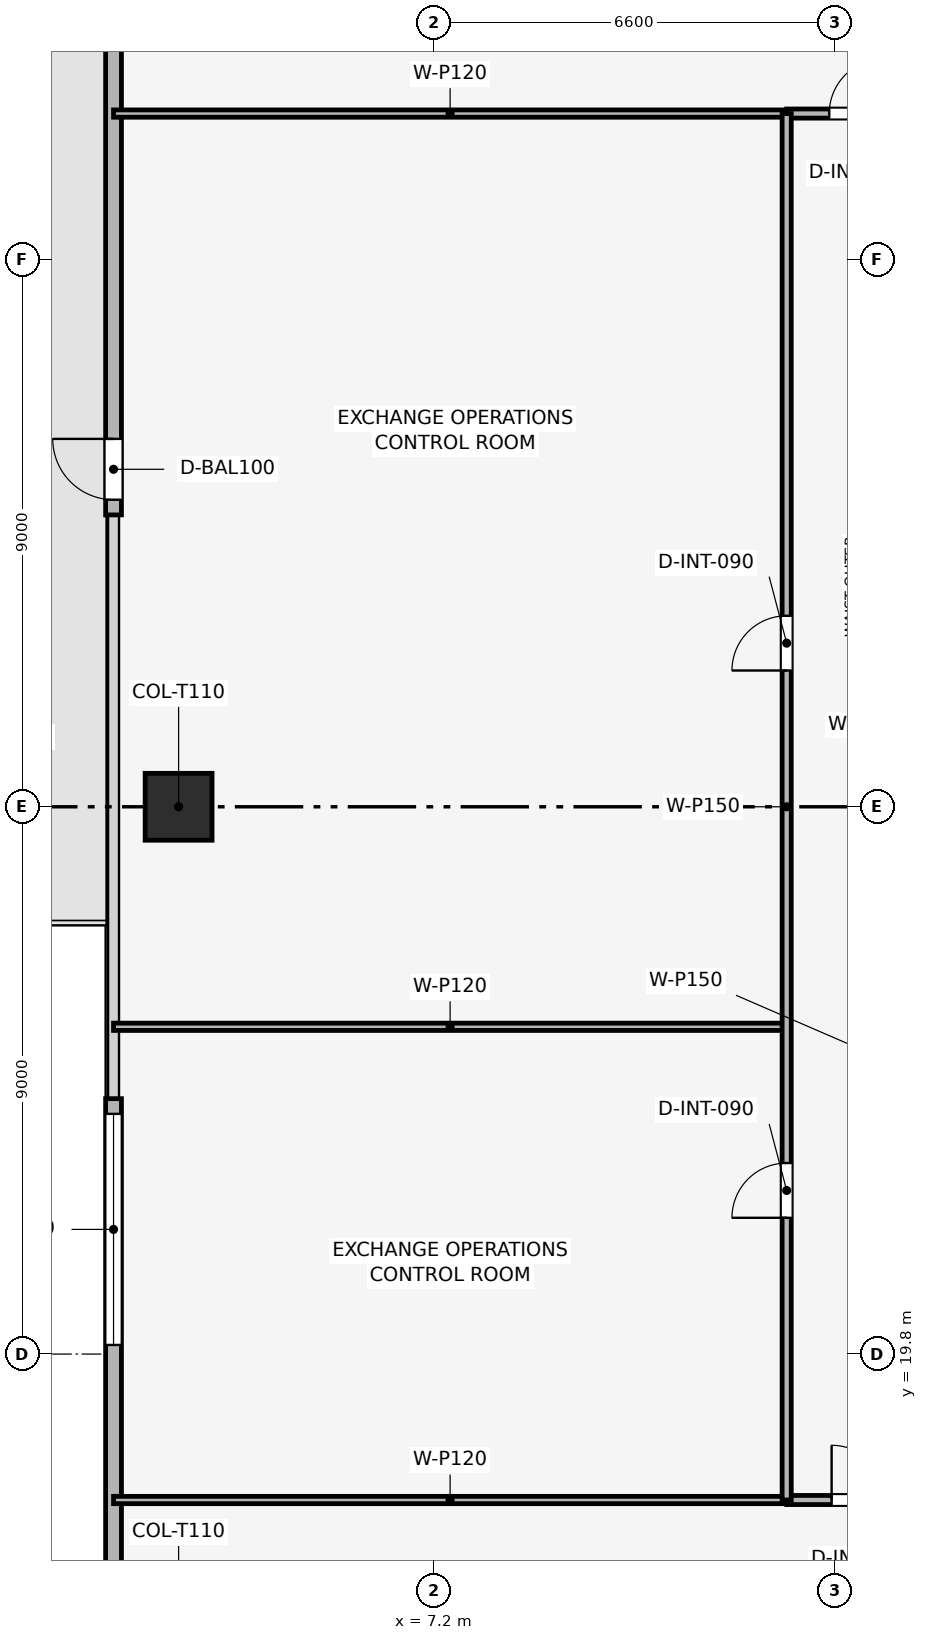
"""IFC4 building model, lengths in metres.
Left out: names, types, materials, properties, quantities, classifications, styles, units other than length and angle.
Written with IfcOpenShell. Run it as: python <this file> out.ifc"""

import sys

from ifc_helpers import new_model, si_unit, direction, frame, frame_2d, origin, origin_2d, place, context, subcontext, project, spatial, rectangle, extrude, element, fill, save


model = new_model("IFC4")
c1 = context("Model", 3, precision=1e-05, world=origin(), true_north=direction((0.0, 1.0)))
c2 = subcontext(c1, "Body", "Model", "MODEL_VIEW")
j1 = project(units=[si_unit("LENGTHUNIT", "METRE"), si_unit("PLANEANGLEUNIT", "RADIAN")], contexts=[c1])
p1 = place(None, origin())
s1 = spatial("IfcSite", under=j1, at=p1, CompositionType="ELEMENT")
p2 = place(p1, origin())
s2 = spatial("IfcBuilding", under=s1, at=p2, CompositionType="ELEMENT")
p3 = place(p2, frame((0.0, 0.0, 218.7)))
s3 = spatial("IfcBuildingStorey", under=s2, at=p3, CompositionType="ELEMENT", Elevation=218.7)
p4 = place(p3, frame((3.0, 28.8, 0.003), z_axis=(0.0, 0.0, 1.0), x_axis=(1.0, 0.0, 0.0)))
e1 = element("IfcColumn", 1, at=p4, inside=s3, PredefinedType="COLUMN", context=c2, shape_type="SweptSolid", body=[
    extrude(rectangle(XDim=1.1, YDim=1.1, at=origin_2d()), origin(), (0.0, 0.0, 1.0), 3.494),
])
p5 = place(p3, frame((1.93, 9.3, 0.0), z_axis=(0.0, 0.0, 1.0), x_axis=(0.0, 1.0, 0.0)))
e2 = element("IfcWall", 2, at=p5, inside=s3, PredefinedType="SOLIDWALL", context=c2, shape_type="SweptSolid", body=[
    extrude(rectangle(XDim=14.7, YDim=0.26, at=frame_2d((7.35, 0.0))), origin(), (0.0, 0.0, 1.0), 3.5),
])
p6 = place(p5, frame((10.65, 0.0, 0.9)))
e3 = element("IfcOpeningElement", 3, at=p6, cuts=e2, PredefinedType="OPENING", context=c2, shape_type="SweptSolid", body=[
    extrude(rectangle(XDim=3.8, YDim=1.9, at=frame_2d((1.9, 0.95))), frame((0.0, 0.14, 0.0), z_axis=(0.0, -1.0, 0.0), x_axis=(1.0, 0.0, 0.0)), (0.0, 0.0, 1.0), 0.28),
])
p7 = place(p3, frame((1.93, 33.6, 0.0), z_axis=(0.0, 0.0, 1.0), x_axis=(0.0, 1.0, 0.0)))
e4 = element("IfcWall", 4, at=p7, inside=s3, PredefinedType="SOLIDWALL", context=c2, shape_type="SweptSolid", body=[
    extrude(rectangle(XDim=14.7, YDim=0.26, at=frame_2d((7.35, 0.0))), origin(), (0.0, 0.0, 1.0), 3.5),
])
p8 = place(p7, frame((0.25, 0.0, 0.0)))
e5 = element("IfcOpeningElement", 5, at=p8, cuts=e4, PredefinedType="OPENING", context=c2, shape_type="SweptSolid", body=[
    extrude(rectangle(XDim=1.0, YDim=2.2, at=frame_2d((0.5, 1.1))), frame((0.0, 0.14, 0.0), z_axis=(0.0, -1.0, 0.0), x_axis=(1.0, 0.0, 0.0)), (0.0, 0.0, 1.0), 0.28),
])
for number, where, z_axis, x_axis in (
    (6, (1.93, 25.182, 0.0), (0.0, 0.0, 1.0), (1.0, 0.0, 0.0)),
    (7, (1.93, 17.4, 0.0), (0.0, 0.0, 1.0), (1.0, 0.0, 0.0)),
    (8, (1.93, 40.2, 0.0), (0.0, 0.0, 1.0), (1.0, 0.0, 0.0)),
):
    element("IfcWall", number, at=place(p3, frame(where, z_axis=z_axis, x_axis=x_axis)), inside=s3, PredefinedType="PARTITIONING", context=c2, shape_type="SweptSolid", body=[
        extrude(rectangle(XDim=11.07, YDim=0.12, at=frame_2d((5.535, 0.0))), origin(), (0.0, 0.0, 1.0), 2.885),
    ])
p9 = place(p3, frame((13.0, 17.4, 0.0), z_axis=(0.0, 0.0, 1.0), x_axis=(1.0, 0.0, 0.0)))
e9 = element("IfcWall", 9, at=p9, inside=s3, PredefinedType="PARTITIONING", context=c2, shape_type="SweptSolid", body=[
    extrude(rectangle(XDim=31.6, YDim=0.15, at=frame_2d((15.8, 0.0))), origin(), (0.0, 0.0, 1.0), 3.035),
])
p10 = place(p9, frame((0.739, 0.0, 0.0)))
e10 = element("IfcOpeningElement", 10, at=p10, cuts=e9, PredefinedType="OPENING", context=c2, shape_type="SweptSolid", body=[
    extrude(rectangle(XDim=0.9, YDim=2.1, at=frame_2d((0.45, 1.05))), frame((0.0, 0.085, 0.0), z_axis=(0.0, -1.0, 0.0), x_axis=(1.0, 0.0, 0.0)), (0.0, 0.0, 1.0), 0.17),
])
p11 = place(p9, frame((6.344, 0.0, 0.0)))
e11 = element("IfcOpeningElement", 11, at=p11, cuts=e9, PredefinedType="OPENING", context=c2, shape_type="SweptSolid", body=[
    extrude(rectangle(XDim=0.9, YDim=2.1, at=frame_2d((0.45, 1.05))), frame((0.0, 0.085, 0.0), z_axis=(0.0, -1.0, 0.0), x_axis=(1.0, 0.0, 0.0)), (0.0, 0.0, 1.0), 0.17),
])
p12 = place(p9, frame((15.174, 0.0, 0.0)))
e12 = element("IfcOpeningElement", 12, at=p12, cuts=e9, PredefinedType="OPENING", context=c2, shape_type="SweptSolid", body=[
    extrude(rectangle(XDim=0.9, YDim=2.1, at=frame_2d((0.45, 1.05))), frame((0.0, 0.085, 0.0), z_axis=(0.0, -1.0, 0.0), x_axis=(1.0, 0.0, 0.0)), (0.0, 0.0, 1.0), 0.17),
])
p13 = place(p9, frame((25.37, 0.0, 0.0)))
e13 = element("IfcOpeningElement", 13, at=p13, cuts=e9, PredefinedType="OPENING", context=c2, shape_type="SweptSolid", body=[
    extrude(rectangle(XDim=0.9, YDim=2.1, at=frame_2d((0.45, 1.05))), frame((0.0, 0.085, 0.0), z_axis=(0.0, -1.0, 0.0), x_axis=(1.0, 0.0, 0.0)), (0.0, 0.0, 1.0), 0.17),
])
p14 = place(p3, frame((13.0, 40.2, 0.0), z_axis=(0.0, 0.0, 1.0), x_axis=(1.0, 0.0, 0.0)))
e14 = element("IfcWall", 14, at=p14, inside=s3, PredefinedType="PARTITIONING", context=c2, shape_type="SweptSolid", body=[
    extrude(rectangle(XDim=31.6, YDim=0.15, at=frame_2d((15.8, 0.0))), origin(), (0.0, 0.0, 1.0), 3.035),
])
p15 = place(p14, frame((0.7, 0.0, 0.0)))
e15 = element("IfcOpeningElement", 15, at=p15, cuts=e14, PredefinedType="OPENING", context=c2, shape_type="SweptSolid", body=[
    extrude(rectangle(XDim=0.9, YDim=2.1, at=frame_2d((0.45, 1.05))), frame((0.0, 0.085, 0.0), z_axis=(0.0, -1.0, 0.0), x_axis=(1.0, 0.0, 0.0)), (0.0, 0.0, 1.0), 0.17),
])
p16 = place(p14, frame((6.454, 0.0, 0.0)))
e16 = element("IfcOpeningElement", 16, at=p16, cuts=e14, PredefinedType="OPENING", context=c2, shape_type="SweptSolid", body=[
    extrude(rectangle(XDim=0.9, YDim=2.1, at=frame_2d((0.45, 1.05))), frame((0.0, 0.085, 0.0), z_axis=(0.0, -1.0, 0.0), x_axis=(1.0, 0.0, 0.0)), (0.0, 0.0, 1.0), 0.17),
])
p17 = place(p14, frame((15.473, 0.0, 0.0)))
e17 = element("IfcOpeningElement", 17, at=p17, cuts=e14, PredefinedType="OPENING", context=c2, shape_type="SweptSolid", body=[
    extrude(rectangle(XDim=0.9, YDim=2.1, at=frame_2d((0.45, 1.05))), frame((0.0, 0.085, 0.0), z_axis=(0.0, -1.0, 0.0), x_axis=(1.0, 0.0, 0.0)), (0.0, 0.0, 1.0), 0.17),
])
p18 = place(p14, frame((25.519, 0.0, 0.0)))
e18 = element("IfcOpeningElement", 18, at=p18, cuts=e14, PredefinedType="OPENING", context=c2, shape_type="SweptSolid", body=[
    extrude(rectangle(XDim=0.9, YDim=2.1, at=frame_2d((0.45, 1.05))), frame((0.0, 0.085, 0.0), z_axis=(0.0, -1.0, 0.0), x_axis=(1.0, 0.0, 0.0)), (0.0, 0.0, 1.0), 0.17),
])
p19 = place(p3, frame((13.0, 17.4, 0.0), z_axis=(0.0, 0.0, 1.0), x_axis=(0.0, 1.0, 0.0)))
e19 = element("IfcWall", 19, at=p19, inside=s3, PredefinedType="PARTITIONING", context=c2, shape_type="SweptSolid", body=[
    extrude(rectangle(XDim=22.8, YDim=0.15, at=frame_2d((11.4, 0.0))), origin(), (0.0, 0.0, 1.0), 3.035),
])
p20 = place(p19, frame((4.641, 0.0, 0.0)))
e20 = element("IfcOpeningElement", 20, at=p20, cuts=e19, PredefinedType="OPENING", context=c2, shape_type="SweptSolid", body=[
    extrude(rectangle(XDim=0.9, YDim=2.1, at=frame_2d((0.45, 1.05))), frame((0.0, 0.085, 0.0), z_axis=(0.0, -1.0, 0.0), x_axis=(1.0, 0.0, 0.0)), (0.0, 0.0, 1.0), 0.17),
])
p21 = place(p19, frame((13.641, 0.0, 0.0)))
e21 = element("IfcOpeningElement", 21, at=p21, cuts=e19, PredefinedType="OPENING", context=c2, shape_type="SweptSolid", body=[
    extrude(rectangle(XDim=0.9, YDim=2.1, at=frame_2d((0.45, 1.05))), frame((0.0, 0.085, 0.0), z_axis=(0.0, -1.0, 0.0), x_axis=(1.0, 0.0, 0.0)), (0.0, 0.0, 1.0), 0.17),
])
p22 = place(p8, origin())
e22 = element("IfcDoor", 22, at=p22, inside=s3, OperationType="SINGLE_SWING_RIGHT", PredefinedType="DOOR", context=c2, shape_type="SweptSolid", body=[
    extrude(rectangle(XDim=1.0, YDim=2.2, at=frame_2d((0.5, 1.1))), frame((0.0, 0.025, 0.0), z_axis=(0.0, -1.0, 0.0), x_axis=(1.0, 0.0, 0.0)), (0.0, 0.0, 1.0), 0.05),
])
fill(e5, e22)
p23 = place(p6, origin())
e23 = element("IfcWindow", 23, at=p23, inside=s3, PartitioningType="SINGLE_PANEL", PredefinedType="WINDOW", context=c2, shape_type="SweptSolid", body=[
    extrude(rectangle(XDim=3.8, YDim=1.9, at=frame_2d((1.9, 0.95))), frame((0.0, 0.03, 0.0), z_axis=(0.0, -1.0, 0.0), x_axis=(1.0, 0.0, 0.0)), (0.0, 0.0, 1.0), 0.06),
])
fill(e3, e23)
p24 = place(p10, origin())
e24 = element("IfcDoor", 24, at=p24, inside=s3, OperationType="SINGLE_SWING_LEFT", PredefinedType="DOOR", context=c2, shape_type="SweptSolid", body=[
    extrude(rectangle(XDim=0.9, YDim=2.1, at=frame_2d((0.45, 1.05))), frame((0.0, 0.025, 0.0), z_axis=(0.0, -1.0, 0.0), x_axis=(1.0, 0.0, 0.0)), (0.0, 0.0, 1.0), 0.05),
])
fill(e10, e24)
p25 = place(p15, origin())
e25 = element("IfcDoor", 25, at=p25, inside=s3, OperationType="SINGLE_SWING_RIGHT", PredefinedType="DOOR", context=c2, shape_type="SweptSolid", body=[
    extrude(rectangle(XDim=0.9, YDim=2.1, at=frame_2d((0.45, 1.05))), frame((0.0, 0.025, 0.0), z_axis=(0.0, -1.0, 0.0), x_axis=(1.0, 0.0, 0.0)), (0.0, 0.0, 1.0), 0.05),
])
fill(e15, e25)
p26 = place(p20, origin())
e26 = element("IfcDoor", 26, at=p26, inside=s3, OperationType="SINGLE_SWING_LEFT", PredefinedType="DOOR", context=c2, shape_type="SweptSolid", body=[
    extrude(rectangle(XDim=0.9, YDim=2.1, at=frame_2d((0.45, 1.05))), frame((0.0, 0.025, 0.0), z_axis=(0.0, -1.0, 0.0), x_axis=(1.0, 0.0, 0.0)), (0.0, 0.0, 1.0), 0.05),
])
fill(e20, e26)
p27 = place(p21, origin())
e27 = element("IfcDoor", 27, at=p27, inside=s3, OperationType="SINGLE_SWING_LEFT", PredefinedType="DOOR", context=c2, shape_type="SweptSolid", body=[
    extrude(rectangle(XDim=0.9, YDim=2.1, at=frame_2d((0.45, 1.05))), frame((0.0, 0.025, 0.0), z_axis=(0.0, -1.0, 0.0), x_axis=(1.0, 0.0, 0.0)), (0.0, 0.0, 1.0), 0.05),
])
fill(e21, e27)
save(model, sys.argv[1])
